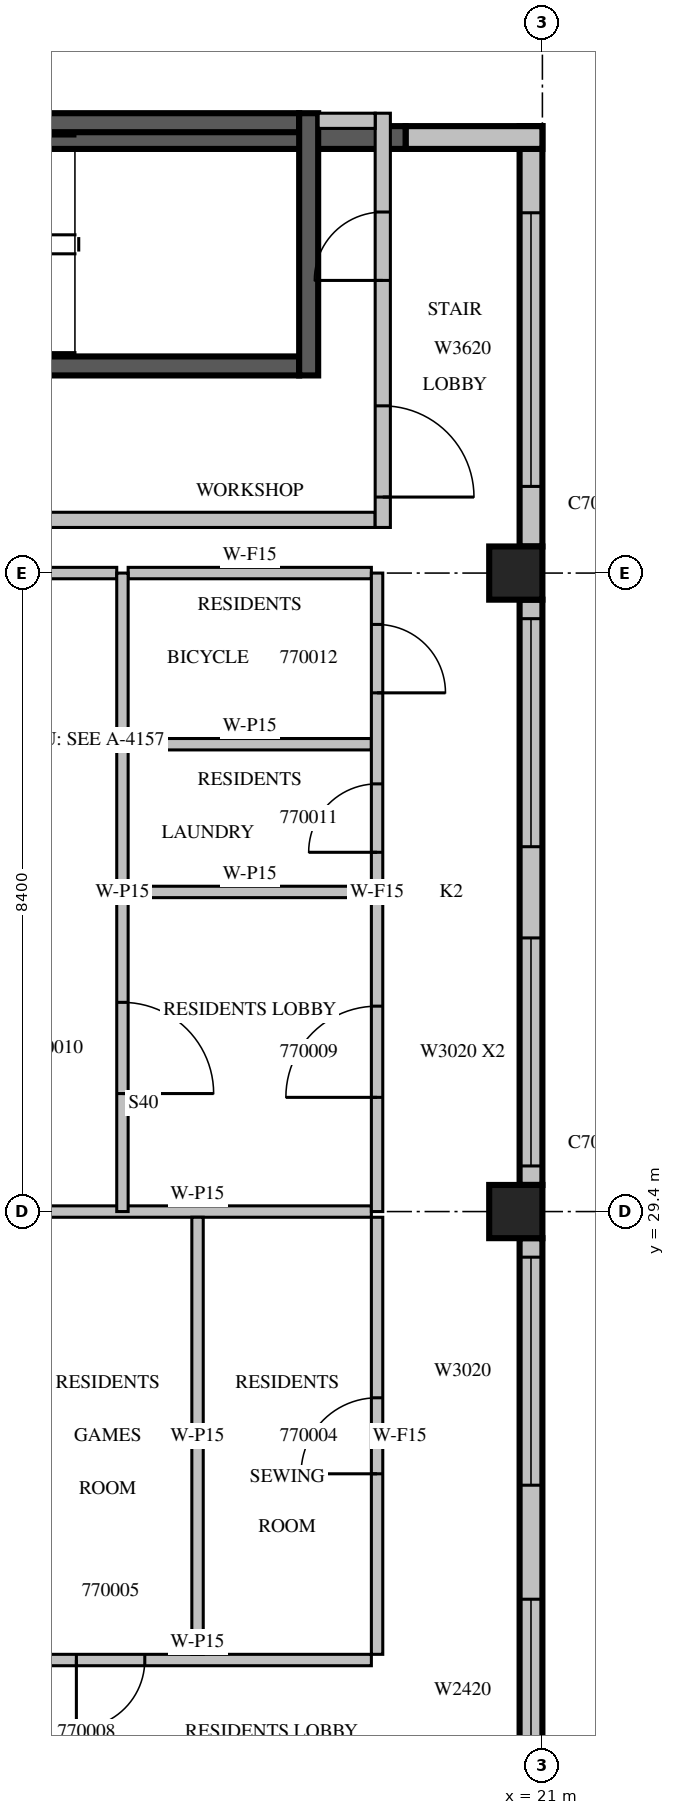
"""IFC4 building model, lengths in metres.
Left out: names, types, materials, properties, quantities, classifications, styles, units other than length and angle.
Written with IfcOpenShell. Run it as: python <this file> out.ifc"""

import sys

from ifc_helpers import new_model, si_unit, direction, frame, frame_2d, origin, origin_2d, place, context, subcontext, project, spatial, rectangle, extrude, source, transform, mapped, element, fill, save


model = new_model("IFC4")
c1 = context("Model", 3, precision=1e-05, world=origin(), true_north=direction((0.0, 1.0)))
c2 = subcontext(c1, "Body", "Model", "MODEL_VIEW")
j1 = project(units=[si_unit("LENGTHUNIT", "METRE"), si_unit("PLANEANGLEUNIT", "RADIAN")], contexts=[c1])
p1 = place(None, origin())
s1 = spatial("IfcSite", under=j1, at=p1, CompositionType="ELEMENT")
p2 = place(p1, origin())
s2 = spatial("IfcBuilding", under=s1, at=p2, CompositionType="ELEMENT")
p3 = place(p2, frame((0.0, 0.0, 305.5)))
s3 = spatial("IfcBuildingStorey", under=s2, at=p3, CompositionType="ELEMENT", Elevation=305.5)
m1 = source(origin(), c2, "Body", "SweptSolid", [
    extrude(rectangle(XDim=0.7, YDim=0.7, at=origin_2d()), origin(), (0.0, 0.0, 1.0), 3.5),
])
for number, where, z_axis, x_axis in (
    (1, (20.65, 29.4, 0.0), (0.0, 0.0, 1.0), (1.0, 0.0, 0.0)),
    (2, (20.65, 37.8, 0.0), (0.0, 0.0, 1.0), (1.0, 0.0, 0.0)),
):
    element("IfcColumn", number, at=place(p3, frame(where, z_axis=z_axis, x_axis=x_axis)), inside=s3, PredefinedType="COLUMN", context=c2, shape_type="MappedRepresentation", body=[
        mapped(m1, transform((0.0, 0.0, 0.0), scale=1.0)),
    ])
m2 = source(origin(), c2, "Body", "SweptSolid", [
    extrude(rectangle(XDim=7.45, YDim=0.3, at=frame_2d((3.725, 0.0))), origin(), (0.0, 0.0, 1.0), 3.1),
])
p4 = place(p3, frame((20.85, 21.6, 0.0), z_axis=(0.0, 0.0, 1.0), x_axis=(0.0, 1.0, 0.0)))
e3 = element("IfcWall", 3, at=p4, inside=s3, PredefinedType="STANDARD", context=c2, shape_type="MappedRepresentation", body=[
    mapped(m2, transform((0.0, 0.0, 0.0), scale=1.0)),
])
m3 = source(origin(), c2, "Body", "SweptSolid", [
    extrude(rectangle(XDim=2.4, YDim=2.0, at=frame_2d((1.2, 1.0))), frame((0.0, 0.16, 0.0), z_axis=(0.0, -1.0, 0.0), x_axis=(1.0, 0.0, 0.0)), (0.0, 0.0, 1.0), 0.32),
])
p5 = place(p4, frame((0.3, 0.0, 0.6)))
e4 = element("IfcOpeningElement", 4, at=p5, cuts=e3, PredefinedType="OPENING", context=c2, shape_type="MappedRepresentation", body=[
    mapped(m3, transform((0.0, 0.0, 0.0), scale=1.0)),
])
m4 = source(origin(), c2, "Body", "SweptSolid", [
    extrude(rectangle(XDim=3.0, YDim=2.0, at=frame_2d((1.5, 1.0))), frame((0.0, 0.16, 0.0), z_axis=(0.0, -1.0, 0.0), x_axis=(1.0, 0.0, 0.0)), (0.0, 0.0, 1.0), 0.32),
])
p6 = place(p4, frame((4.2, 0.0, 0.6)))
e5 = element("IfcOpeningElement", 5, at=p6, cuts=e3, PredefinedType="OPENING", context=c2, shape_type="MappedRepresentation", body=[
    mapped(m4, transform((0.0, 0.0, 0.0), scale=1.0)),
])
m5 = source(origin(), c2, "Body", "SweptSolid", [
    extrude(rectangle(XDim=7.7, YDim=0.3, at=frame_2d((3.85, 0.0))), origin(), (0.0, 0.0, 1.0), 3.1),
])
p7 = place(p3, frame((20.85, 29.75, 0.0), z_axis=(0.0, 0.0, 1.0), x_axis=(0.0, 1.0, 0.0)))
e6 = element("IfcWall", 6, at=p7, inside=s3, PredefinedType="STANDARD", context=c2, shape_type="MappedRepresentation", body=[
    mapped(m5, transform((0.0, 0.0, 0.0), scale=1.0)),
])
p8 = place(p7, frame((0.25, 0.0, 0.6)))
e7 = element("IfcOpeningElement", 7, at=p8, cuts=e6, PredefinedType="OPENING", context=c2, shape_type="MappedRepresentation", body=[
    mapped(m4, transform((0.0, 0.0, 0.0), scale=1.0)),
])
p9 = place(p7, frame((4.45, 0.0, 0.6)))
e8 = element("IfcOpeningElement", 8, at=p9, cuts=e6, PredefinedType="OPENING", context=c2, shape_type="MappedRepresentation", body=[
    mapped(m4, transform((0.0, 0.0, 0.0), scale=1.0)),
])
m6 = source(origin(), c2, "Body", "SweptSolid", [
    extrude(rectangle(XDim=5.53, YDim=0.3, at=frame_2d((2.765, 0.0))), origin(), (0.0, 0.0, 1.0), 3.1),
])
p10 = place(p3, frame((20.85, 38.15, 0.0), z_axis=(0.0, 0.0, 1.0), x_axis=(0.0, 1.0, 0.0)))
e9 = element("IfcWall", 9, at=p10, inside=s3, PredefinedType="STANDARD", context=c2, shape_type="MappedRepresentation", body=[
    mapped(m6, transform((0.0, 0.0, 0.0), scale=1.0)),
])
m7 = source(origin(), c2, "Body", "SweptSolid", [
    extrude(rectangle(XDim=3.6, YDim=2.0, at=frame_2d((1.8, 1.0))), frame((0.0, 0.16, 0.0), z_axis=(0.0, -1.0, 0.0), x_axis=(1.0, 0.0, 0.0)), (0.0, 0.0, 1.0), 0.32),
])
p11 = place(p10, frame((0.79, 0.0, 0.6)))
e10 = element("IfcOpeningElement", 10, at=p11, cuts=e9, PredefinedType="OPENING", context=c2, shape_type="MappedRepresentation", body=[
    mapped(m7, transform((0.0, 0.0, 0.0), scale=1.0)),
])
m8 = source(origin(), c2, "Body", "SweptSolid", [
    extrude(rectangle(XDim=1.8, YDim=0.3, at=frame_2d((0.9, 0.0))), origin(), (0.0, 0.0, 1.0), 3.1),
])
p12 = place(p3, frame((21.0, 43.53, 0.0), z_axis=(0.0, 0.0, 1.0), x_axis=(-1.0, 0.0, 0.0)))
e11 = element("IfcWall", 11, at=p12, inside=s3, PredefinedType="STANDARD", context=c2, shape_type="MappedRepresentation", body=[
    mapped(m8, transform((0.0, 0.0, 0.0), scale=1.0)),
])
m9 = source(origin(), c2, "Body", "SweptSolid", [
    extrude(rectangle(XDim=8.6, YDim=0.3, at=frame_2d((4.3, 0.0))), origin(), (0.0, 0.0, 1.0), 3.1),
])
p13 = place(p3, frame((19.2, 43.53, 0.0), z_axis=(0.0, 0.0, 1.0), x_axis=(-1.0, 0.0, 0.0)))
e12 = element("IfcWall", 12, at=p13, inside=s3, PredefinedType="SOLIDWALL", context=c2, shape_type="MappedRepresentation", body=[
    mapped(m9, transform((0.0, 0.0, 0.0), scale=1.0)),
])
m10 = source(origin(), c2, "Body", "SweptSolid", [
    extrude(rectangle(XDim=7.0, YDim=0.25, at=frame_2d((3.5, 0.0))), origin(), (0.0, 0.0, 1.0), 3.1),
])
p14 = place(p3, frame((10.8, 40.525, 0.0), z_axis=(0.0, 0.0, 1.0), x_axis=(1.0, 0.0, 0.0)))
e13 = element("IfcWall", 13, at=p14, inside=s3, PredefinedType="SOLIDWALL", context=c2, shape_type="MappedRepresentation", body=[
    mapped(m10, transform((0.0, 0.0, 0.0), scale=1.0)),
])
m11 = source(origin(), c2, "Body", "SweptSolid", [
    extrude(rectangle(XDim=1.1, YDim=2.1, at=frame_2d((0.55, 1.05))), frame((0.0, 0.135, 0.0), z_axis=(0.0, -1.0, 0.0), x_axis=(1.0, 0.0, 0.0)), (0.0, 0.0, 1.0), 0.27),
])
p15 = place(p14, frame((0.55, 0.0, 0.0)))
e14 = element("IfcOpeningElement", 14, at=p15, cuts=e13, PredefinedType="OPENING", context=c2, shape_type="MappedRepresentation", body=[
    mapped(m11, transform((0.0, 0.0, 0.0), scale=1.0)),
])
p16 = place(p3, frame((10.8, 43.725, 0.0), z_axis=(0.0, 0.0, 1.0), x_axis=(1.0, 0.0, 0.0)))
e15 = element("IfcWall", 15, at=p16, inside=s3, PredefinedType="SOLIDWALL", context=c2, shape_type="MappedRepresentation", body=[
    mapped(m10, transform((0.0, 0.0, 0.0), scale=1.0)),
])
m12 = source(origin(), c2, "Body", "SweptSolid", [
    extrude(rectangle(XDim=3.45, YDim=0.25, at=frame_2d((1.725, 0.0))), origin(), (0.0, 0.0, 1.0), 3.1),
])
p17 = place(p3, frame((17.925, 40.4, 0.0), z_axis=(0.0, 0.0, 1.0), x_axis=(0.0, 1.0, 0.0)))
e16 = element("IfcWall", 16, at=p17, inside=s3, PredefinedType="SOLIDWALL", context=c2, shape_type="MappedRepresentation", body=[
    mapped(m12, transform((0.0, 0.0, 0.0), scale=1.0)),
])
m13 = source(origin(), c2, "Body", "SweptSolid", [
    extrude(rectangle(XDim=8.0, YDim=0.2, at=frame_2d((4.0, 0.0))), origin(), (0.0, 0.0, 1.0), 3.1),
])
p18 = place(p3, frame((10.8, 38.5, 0.0), z_axis=(0.0, 0.0, 1.0), x_axis=(1.0, 0.0, 0.0)))
e17 = element("IfcWall", 17, at=p18, inside=s3, PredefinedType="PARTITIONING", context=c2, shape_type="MappedRepresentation", body=[
    mapped(m13, transform((0.0, 0.0, 0.0), scale=1.0)),
])
m14 = source(origin(), c2, "Body", "SweptSolid", [
    extrude(rectangle(XDim=5.45, YDim=0.2, at=frame_2d((2.725, 0.0))), origin(), (0.0, 0.0, 1.0), 3.1),
])
p19 = place(p3, frame((18.9, 38.4, 0.0), z_axis=(0.0, 0.0, 1.0), x_axis=(0.0, 1.0, 0.0)))
e18 = element("IfcWall", 18, at=p19, inside=s3, PredefinedType="PARTITIONING", context=c2, shape_type="MappedRepresentation", body=[
    mapped(m14, transform((0.0, 0.0, 0.0), scale=1.0)),
])
m15 = source(origin(), c2, "Body", "SweptSolid", [
    extrude(rectangle(XDim=1.2, YDim=2.1, at=frame_2d((0.6, 1.05))), frame((0.0, 0.11, 0.0), z_axis=(0.0, -1.0, 0.0), x_axis=(1.0, 0.0, 0.0)), (0.0, 0.0, 1.0), 0.22),
])
p20 = place(p19, frame((0.4, 0.0, 0.0)))
e19 = element("IfcOpeningElement", 19, at=p20, cuts=e18, PredefinedType="OPENING", context=c2, shape_type="MappedRepresentation", body=[
    mapped(m15, transform((0.0, 0.0, 0.0), scale=1.0)),
])
m16 = source(origin(), c2, "Body", "SweptSolid", [
    extrude(rectangle(XDim=0.9, YDim=2.1, at=frame_2d((0.45, 1.05))), frame((0.0, 0.11, 0.0), z_axis=(0.0, -1.0, 0.0), x_axis=(1.0, 0.0, 0.0)), (0.0, 0.0, 1.0), 0.22),
])
p21 = place(p19, frame((3.25, 0.0, 0.0)))
e20 = element("IfcOpeningElement", 20, at=p21, cuts=e18, PredefinedType="OPENING", context=c2, shape_type="MappedRepresentation", body=[
    mapped(m16, transform((0.0, 0.0, 0.0), scale=1.0)),
])
m17 = source(origin(), c2, "Body", "SweptSolid", [
    extrude(rectangle(XDim=0.75, YDim=0.2, at=frame_2d((0.375, 0.0))), origin(), (0.0, 0.0, 1.0), 3.1),
])
p22 = place(p3, frame((18.05, 43.75, 0.0), z_axis=(0.0, 0.0, 1.0), x_axis=(1.0, 0.0, 0.0)))
e21 = element("IfcWall", 21, at=p22, inside=s3, PredefinedType="PARTITIONING", context=c2, shape_type="MappedRepresentation", body=[
    mapped(m17, transform((0.0, 0.0, 0.0), scale=1.0)),
])
m18 = source(origin(), c2, "Body", "SweptSolid", [
    extrude(rectangle(XDim=4.575, YDim=0.15, at=frame_2d((2.288, 0.0))), origin(), (0.0, 0.0, 1.0), 3.1),
])
p23 = place(p3, frame((14.175, 23.5, 0.0), z_axis=(0.0, 0.0, 1.0), x_axis=(1.0, 0.0, 0.0)))
e22 = element("IfcWall", 22, at=p23, inside=s3, PredefinedType="PARTITIONING", context=c2, shape_type="MappedRepresentation", body=[
    mapped(m18, transform((0.0, 0.0, 0.0), scale=1.0)),
])
m19 = source(origin(), c2, "Body", "SweptSolid", [
    extrude(rectangle(XDim=0.9, YDim=2.1, at=frame_2d((0.45, 1.05))), frame((0.0, 0.085, 0.0), z_axis=(0.0, -1.0, 0.0), x_axis=(1.0, 0.0, 0.0)), (0.0, 0.0, 1.0), 0.17),
])
p24 = place(p23, frame((0.694, 0.0, 0.0)))
e23 = element("IfcOpeningElement", 23, at=p24, cuts=e22, PredefinedType="OPENING", context=c2, shape_type="MappedRepresentation", body=[
    mapped(m19, transform((0.0, 0.0, 0.0), scale=1.0)),
])
p25 = place(p3, frame((18.75, 29.4, 0.0), z_axis=(0.0, 0.0, 1.0), x_axis=(-1.0, 0.0, 0.0)))
e24 = element("IfcWall", 24, at=p25, inside=s3, PredefinedType="PARTITIONING", context=c2, shape_type="MappedRepresentation", body=[
    mapped(m18, transform((0.0, 0.0, 0.0), scale=1.0)),
])
m20 = source(origin(), c2, "Body", "SweptSolid", [
    extrude(rectangle(XDim=5.75, YDim=0.15, at=frame_2d((2.875, 0.0))), origin(), (0.0, 0.0, 1.0), 3.1),
])
p26 = place(p3, frame((18.825, 23.575, 0.0), z_axis=(0.0, 0.0, 1.0), x_axis=(0.0, 1.0, 0.0)))
e25 = element("IfcWall", 25, at=p26, inside=s3, PredefinedType="PARTITIONING", context=c2, shape_type="MappedRepresentation", body=[
    mapped(m20, transform((0.0, 0.0, 0.0), scale=1.0)),
])
m21 = source(origin(), c2, "Body", "SweptSolid", [
    extrude(rectangle(XDim=1.0, YDim=2.1, at=frame_2d((0.5, 1.05))), frame((0.0, 0.085, 0.0), z_axis=(0.0, -1.0, 0.0), x_axis=(1.0, 0.0, 0.0)), (0.0, 0.0, 1.0), 0.17),
])
p27 = place(p26, frame((2.375, 0.0, 0.0)))
e26 = element("IfcOpeningElement", 26, at=p27, cuts=e25, PredefinedType="OPENING", context=c2, shape_type="MappedRepresentation", body=[
    mapped(m21, transform((0.0, 0.0, 0.0), scale=1.0)),
])
p28 = place(p3, frame((16.463, 23.575, 0.0), z_axis=(0.0, 0.0, 1.0), x_axis=(0.0, 1.0, 0.0)))
e27 = element("IfcWall", 27, at=p28, inside=s3, PredefinedType="PARTITIONING", context=c2, shape_type="MappedRepresentation", body=[
    mapped(m20, transform((0.0, 0.0, 0.0), scale=1.0)),
])
m22 = source(origin(), c2, "Body", "SweptSolid", [
    extrude(rectangle(XDim=3.2, YDim=0.15, at=frame_2d((1.6, 0.0))), origin(), (0.0, 0.0, 1.0), 3.1),
])
for number, where, z_axis, x_axis in (
    (28, (18.75, 33.605, 0.0), (0.0, 0.0, 1.0), (-1.0, 0.0, 0.0)),
    (29, (18.75, 35.548, 0.0), (0.0, 0.0, 1.0), (-1.0, 0.0, 0.0)),
):
    element("IfcWall", number, at=place(p3, frame(where, z_axis=z_axis, x_axis=x_axis)), inside=s3, PredefinedType="PARTITIONING", context=c2, shape_type="MappedRepresentation", body=[
        mapped(m22, transform((0.0, 0.0, 0.0), scale=1.0)),
    ])
m23 = source(origin(), c2, "Body", "SweptSolid", [
    extrude(rectangle(XDim=4.201, YDim=0.15, at=frame_2d((2.1, 0.0))), origin(), (0.0, 0.0, 1.0), 3.1),
])
p29 = place(p3, frame((15.4, 37.8, 0.0), z_axis=(0.0, 0.0, 1.0), x_axis=(-1.0, 0.0, 0.0)))
e30 = element("IfcWall", 30, at=p29, inside=s3, PredefinedType="PARTITIONING", context=c2, shape_type="MappedRepresentation", body=[
    mapped(m23, transform((0.0, 0.0, 0.0), scale=1.0)),
])
p30 = place(p3, frame((18.75, 37.8, 0.0), z_axis=(0.0, 0.0, 1.0), x_axis=(-1.0, 0.0, 0.0)))
e31 = element("IfcWall", 31, at=p30, inside=s3, PredefinedType="PARTITIONING", context=c2, shape_type="MappedRepresentation", body=[
    mapped(m22, transform((0.0, 0.0, 0.0), scale=1.0)),
])
m24 = source(origin(), c2, "Body", "SweptSolid", [
    extrude(rectangle(XDim=8.4, YDim=0.15, at=frame_2d((4.2, 0.0))), origin(), (0.0, 0.0, 1.0), 3.1),
])
p31 = place(p3, frame((15.475, 29.4, 0.0), z_axis=(0.0, 0.0, 1.0), x_axis=(0.0, 1.0, 0.0)))
e32 = element("IfcWall", 32, at=p31, inside=s3, PredefinedType="PARTITIONING", context=c2, shape_type="MappedRepresentation", body=[
    mapped(m24, transform((0.0, 0.0, 0.0), scale=1.0)),
])
m25 = source(origin(), c2, "Body", "SweptSolid", [
    extrude(rectangle(XDim=1.2, YDim=2.1, at=frame_2d((0.6, 1.05))), frame((0.0, 0.085, 0.0), z_axis=(0.0, -1.0, 0.0), x_axis=(1.0, 0.0, 0.0)), (0.0, 0.0, 1.0), 0.17),
])
p32 = place(p31, frame((1.552, 0.0, 0.0)))
e33 = element("IfcOpeningElement", 33, at=p32, cuts=e32, PredefinedType="OPENING", context=c2, shape_type="MappedRepresentation", body=[
    mapped(m25, transform((0.0, 0.0, 0.0), scale=1.0)),
])
p33 = place(p3, frame((18.825, 29.4, 0.0), z_axis=(0.0, 0.0, 1.0), x_axis=(0.0, 1.0, 0.0)))
e34 = element("IfcWall", 34, at=p33, inside=s3, PredefinedType="PARTITIONING", context=c2, shape_type="MappedRepresentation", body=[
    mapped(m24, transform((0.0, 0.0, 0.0), scale=1.0)),
])
p34 = place(p33, frame((1.502, 0.0, 0.0)))
e35 = element("IfcOpeningElement", 35, at=p34, cuts=e34, PredefinedType="OPENING", context=c2, shape_type="MappedRepresentation", body=[
    mapped(m25, transform((0.0, 0.0, 0.0), scale=1.0)),
])
p35 = place(p33, frame((4.727, 0.0, 0.0)))
e36 = element("IfcOpeningElement", 36, at=p35, cuts=e34, PredefinedType="OPENING", context=c2, shape_type="MappedRepresentation", body=[
    mapped(m19, transform((0.0, 0.0, 0.0), scale=1.0)),
])
p36 = place(p33, frame((6.824, 0.0, 0.0)))
e37 = element("IfcOpeningElement", 37, at=p36, cuts=e34, PredefinedType="OPENING", context=c2, shape_type="MappedRepresentation", body=[
    mapped(m19, transform((0.0, 0.0, 0.0), scale=1.0)),
])
m26 = source(origin(), c2, "Body", "SweptSolid", [
    extrude(rectangle(XDim=2.4, YDim=2.0, at=frame_2d((1.2, 1.0))), frame((0.0, 0.03, 0.0), z_axis=(0.0, -1.0, 0.0), x_axis=(1.0, 0.0, 0.0)), (0.0, 0.0, 1.0), 0.06),
])
p37 = place(p5, origin())
e38 = element("IfcWindow", 38, at=p37, inside=s3, PartitioningType="SINGLE_PANEL", PredefinedType="WINDOW", context=c2, shape_type="MappedRepresentation", body=[
    mapped(m26, transform((0.0, 0.0, 0.0), scale=1.0)),
])
fill(e4, e38)
m27 = source(origin(), c2, "Body", "SweptSolid", [
    extrude(rectangle(XDim=3.0, YDim=2.0, at=frame_2d((1.5, 1.0))), frame((0.0, 0.03, 0.0), z_axis=(0.0, -1.0, 0.0), x_axis=(1.0, 0.0, 0.0)), (0.0, 0.0, 1.0), 0.06),
])
p38 = place(p6, origin())
e39 = element("IfcWindow", 39, at=p38, inside=s3, PartitioningType="SINGLE_PANEL", PredefinedType="WINDOW", context=c2, shape_type="MappedRepresentation", body=[
    mapped(m27, transform((0.0, 0.0, 0.0), scale=1.0)),
])
fill(e5, e39)
p39 = place(p8, origin())
e40 = element("IfcWindow", 40, at=p39, inside=s3, PartitioningType="SINGLE_PANEL", PredefinedType="WINDOW", context=c2, shape_type="MappedRepresentation", body=[
    mapped(m27, transform((0.0, 0.0, 0.0), scale=1.0)),
])
fill(e7, e40)
p40 = place(p9, origin())
e41 = element("IfcWindow", 41, at=p40, inside=s3, PartitioningType="SINGLE_PANEL", PredefinedType="WINDOW", context=c2, shape_type="MappedRepresentation", body=[
    mapped(m27, transform((0.0, 0.0, 0.0), scale=1.0)),
])
fill(e8, e41)
m28 = source(origin(), c2, "Body", "SweptSolid", [
    extrude(rectangle(XDim=3.6, YDim=2.0, at=frame_2d((1.8, 1.0))), frame((0.0, 0.03, 0.0), z_axis=(0.0, -1.0, 0.0), x_axis=(1.0, 0.0, 0.0)), (0.0, 0.0, 1.0), 0.06),
])
p41 = place(p11, origin())
e42 = element("IfcWindow", 42, at=p41, inside=s3, PartitioningType="SINGLE_PANEL", PredefinedType="WINDOW", context=c2, shape_type="MappedRepresentation", body=[
    mapped(m28, transform((0.0, 0.0, 0.0), scale=1.0)),
])
fill(e10, e42)
m29 = source(origin(), c2, "Body", "SweptSolid", [
    extrude(rectangle(XDim=1.2, YDim=2.1, at=frame_2d((0.6, 1.05))), frame((0.0, 0.025, 0.0), z_axis=(0.0, -1.0, 0.0), x_axis=(1.0, 0.0, 0.0)), (0.0, 0.0, 1.0), 0.05),
])
p42 = place(p20, origin())
e43 = element("IfcDoor", 43, at=p42, inside=s3, OperationType="SINGLE_SWING_RIGHT", PredefinedType="DOOR", context=c2, shape_type="MappedRepresentation", body=[
    mapped(m29, transform((0.0, 0.0, 0.0), scale=1.0)),
])
fill(e19, e43)
m30 = source(origin(), c2, "Body", "SweptSolid", [
    extrude(rectangle(XDim=0.9, YDim=2.1, at=frame_2d((0.45, 1.05))), frame((0.0, 0.025, 0.0), z_axis=(0.0, -1.0, 0.0), x_axis=(1.0, 0.0, 0.0)), (0.0, 0.0, 1.0), 0.05),
])
p43 = place(p21, origin())
e44 = element("IfcDoor", 44, at=p43, inside=s3, OperationType="SINGLE_SWING_LEFT", PredefinedType="DOOR", context=c2, shape_type="MappedRepresentation", body=[
    mapped(m30, transform((0.0, 0.0, 0.0), scale=1.0)),
])
fill(e20, e44)
m31 = source(origin(), c2, "Body", "SweptSolid", [
    extrude(rectangle(XDim=1.0, YDim=2.1, at=frame_2d((0.5, 1.05))), frame((0.0, 0.025, 0.0), z_axis=(0.0, -1.0, 0.0), x_axis=(1.0, 0.0, 0.0)), (0.0, 0.0, 1.0), 0.05),
])
p44 = place(p27, origin())
e45 = element("IfcDoor", 45, at=p44, inside=s3, OperationType="SINGLE_SWING_LEFT", PredefinedType="DOOR", context=c2, shape_type="MappedRepresentation", body=[
    mapped(m31, transform((0.0, 0.0, 0.0), scale=1.0)),
])
fill(e26, e45)
p45 = place(p24, origin())
e46 = element("IfcDoor", 46, at=p45, inside=s3, OperationType="SINGLE_SWING_RIGHT", PredefinedType="DOOR", context=c2, shape_type="MappedRepresentation", body=[
    mapped(m30, transform((0.0, 0.0, 0.0), scale=1.0)),
])
fill(e23, e46)
p46 = place(p34, origin())
e47 = element("IfcDoor", 47, at=p46, inside=s3, OperationType="SINGLE_SWING_LEFT", PredefinedType="DOOR", context=c2, shape_type="MappedRepresentation", body=[
    mapped(m29, transform((0.0, 0.0, 0.0), scale=1.0)),
])
fill(e35, e47)
p47 = place(p32, origin())
e48 = element("IfcDoor", 48, at=p47, inside=s3, OperationType="SINGLE_SWING_RIGHT", PredefinedType="DOOR", context=c2, shape_type="MappedRepresentation", body=[
    mapped(m29, transform((0.0, 0.0, 0.0), scale=1.0)),
])
fill(e33, e48)
p48 = place(p35, origin())
e49 = element("IfcDoor", 49, at=p48, inside=s3, OperationType="SINGLE_SWING_LEFT", PredefinedType="DOOR", context=c2, shape_type="MappedRepresentation", body=[
    mapped(m30, transform((0.0, 0.0, 0.0), scale=1.0)),
])
fill(e36, e49)
p49 = place(p36, origin())
e50 = element("IfcDoor", 50, at=p49, inside=s3, OperationType="SINGLE_SWING_RIGHT", PredefinedType="DOOR", context=c2, shape_type="MappedRepresentation", body=[
    mapped(m30, transform((0.0, 0.0, 0.0), scale=1.0)),
])
fill(e37, e50)
save(model, sys.argv[1])
